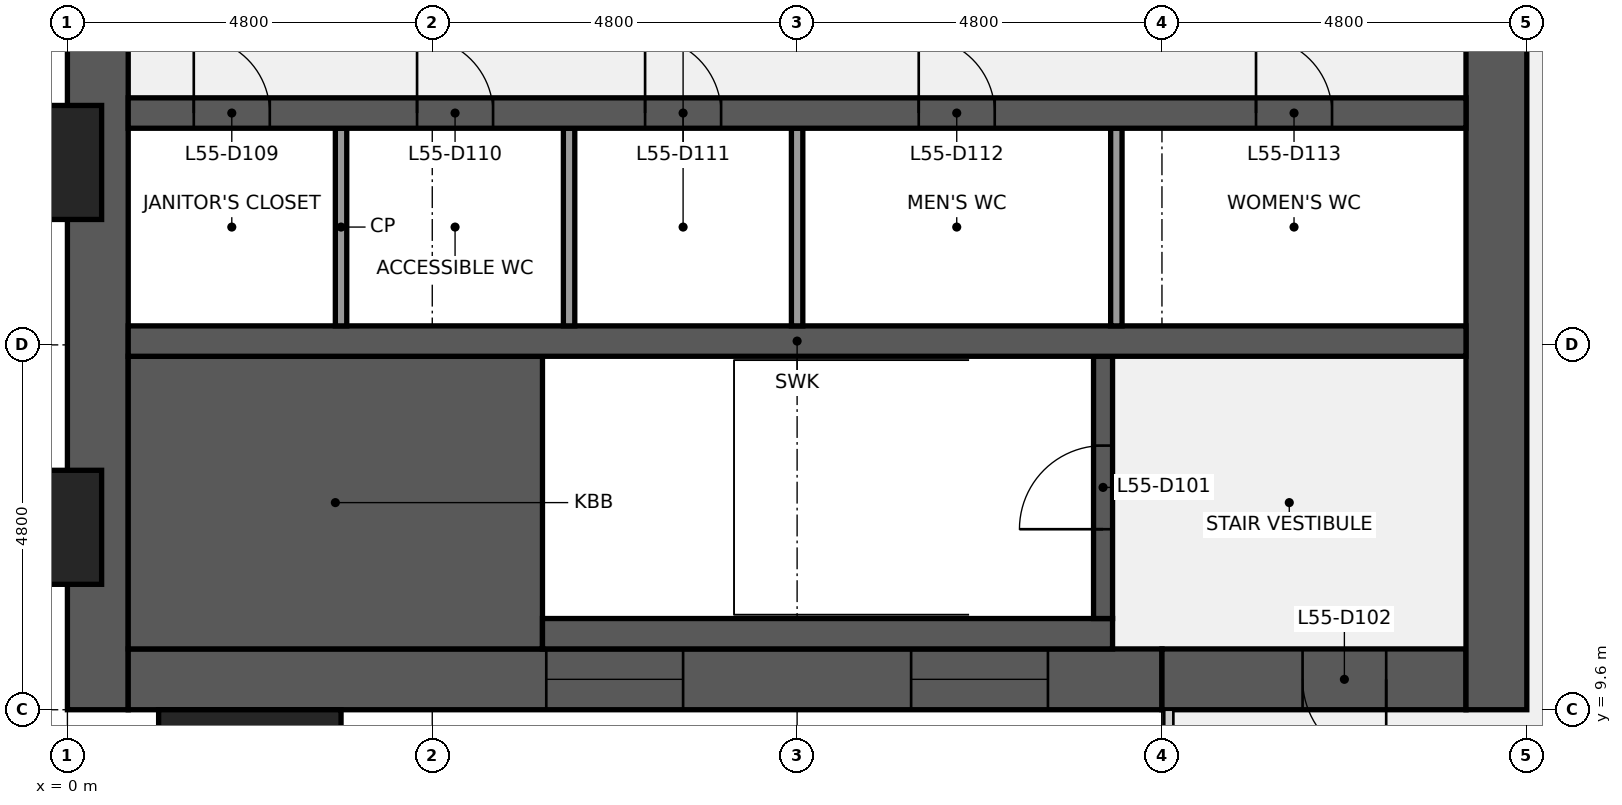
"""IFC4 building model, lengths in metres.
Left out: names, types, materials, properties, quantities, classifications, styles, units other than length and angle.
Written with IfcOpenShell. Run it as: python <this file> out.ifc"""

import sys

from ifc_helpers import new_model, si_unit, direction, frame, frame_2d, origin, origin_2d, place, context, subcontext, project, spatial, rectangle, extrude, element, fill, save


model = new_model("IFC4")
c1 = context("Model", 3, precision=1e-05, world=origin(), true_north=direction((0.0, 1.0)))
c2 = subcontext(c1, "Body", "Model", "MODEL_VIEW")
j1 = project(units=[si_unit("LENGTHUNIT", "METRE"), si_unit("PLANEANGLEUNIT", "RADIAN")], contexts=[c1])
p1 = place(None, origin())
s1 = spatial("IfcSite", under=j1, at=p1, CompositionType="ELEMENT")
p2 = place(p1, origin())
s2 = spatial("IfcBuilding", under=s1, at=p2, CompositionType="ELEMENT")
p3 = place(p2, frame((0.0, 0.0, 249.2)))
s3 = spatial("IfcBuildingStorey", under=s2, at=p3, CompositionType="ELEMENT", Elevation=249.2)
p4 = place(p3, frame((0.4, 9.6, 0.0), z_axis=(0.0, 0.0, 1.0), x_axis=(0.0, 1.0, 0.0)))
e1 = element("IfcWall", 1, at=p4, inside=s3, PredefinedType="SHEAR", context=c2, shape_type="SweptSolid", body=[
    extrude(rectangle(XDim=28.8, YDim=0.8, at=frame_2d((14.4, 0.0))), origin(), (0.0, 0.0, 1.0), 3.84),
])
p5 = place(p4, frame((8.85, 0.0, 0.9)))
e2 = element("IfcOpeningElement", 2, at=p5, cuts=e1, PredefinedType="OPENING", context=c2, shape_type="SweptSolid", body=[
    extrude(rectangle(XDim=1.5, YDim=1.5, at=frame_2d((0.75, 0.75))), frame((0.0, 0.41, 0.0), z_axis=(0.0, -1.0, 0.0), x_axis=(1.0, 0.0, 0.0)), (0.0, 0.0, 1.0), 0.82),
])
p6 = place(p4, frame((18.45, 0.0, 0.9)))
e3 = element("IfcOpeningElement", 3, at=p6, cuts=e1, PredefinedType="OPENING", context=c2, shape_type="SweptSolid", body=[
    extrude(rectangle(XDim=1.5, YDim=1.5, at=frame_2d((0.75, 0.75))), frame((0.0, 0.41, 0.0), z_axis=(0.0, -1.0, 0.0), x_axis=(1.0, 0.0, 0.0)), (0.0, 0.0, 1.0), 0.82),
])
p7 = place(p3, frame((14.4, 10.0, 0.0), z_axis=(0.0, 0.0, 1.0), x_axis=(-1.0, 0.0, 0.0)))
e4 = element("IfcWall", 4, at=p7, inside=s3, PredefinedType="SHEAR", context=c2, shape_type="SweptSolid", body=[
    extrude(rectangle(XDim=13.6, YDim=0.8, at=frame_2d((6.8, 0.0))), origin(), (0.0, 0.0, 1.0), 3.84),
])
p8 = place(p7, frame((6.3, 0.0, 0.9)))
e5 = element("IfcOpeningElement", 5, at=p8, cuts=e4, PredefinedType="OPENING", context=c2, shape_type="SweptSolid", body=[
    extrude(rectangle(XDim=1.8, YDim=1.5, at=frame_2d((0.9, 0.75))), frame((0.0, 0.41, 0.0), z_axis=(0.0, -1.0, 0.0), x_axis=(1.0, 0.0, 0.0)), (0.0, 0.0, 1.0), 0.82),
])
p9 = place(p7, frame((1.5, 0.0, 0.9)))
e6 = element("IfcOpeningElement", 6, at=p9, cuts=e4, PredefinedType="OPENING", context=c2, shape_type="SweptSolid", body=[
    extrude(rectangle(XDim=1.8, YDim=1.5, at=frame_2d((0.9, 0.75))), frame((0.0, 0.41, 0.0), z_axis=(0.0, -1.0, 0.0), x_axis=(1.0, 0.0, 0.0)), (0.0, 0.0, 1.0), 0.82),
])
p10 = place(p3, frame((18.4, 10.0, 0.0), z_axis=(0.0, 0.0, 1.0), x_axis=(-1.0, 0.0, 0.0)))
e7 = element("IfcWall", 7, at=p10, inside=s3, PredefinedType="SHEAR", context=c2, shape_type="SweptSolid", body=[
    extrude(rectangle(XDim=4.0, YDim=0.8, at=frame_2d((2.0, 0.0))), origin(), (0.0, 0.0, 1.0), 3.84),
])
p11 = place(p10, frame((1.05, 0.0, 0.0)))
e8 = element("IfcOpeningElement", 8, at=p11, cuts=e7, PredefinedType="OPENING", context=c2, shape_type="SweptSolid", body=[
    extrude(rectangle(XDim=1.1, YDim=2.1, at=frame_2d((0.55, 1.05))), frame((0.0, 0.41, 0.0), z_axis=(0.0, -1.0, 0.0), x_axis=(1.0, 0.0, 0.0)), (0.0, 0.0, 1.0), 0.82),
])
p12 = place(p3, frame((18.8, 38.4, 0.0), z_axis=(0.0, 0.0, 1.0), x_axis=(0.0, -1.0, 0.0)))
e9 = element("IfcWall", 9, at=p12, inside=s3, PredefinedType="SHEAR", context=c2, shape_type="SweptSolid", body=[
    extrude(rectangle(XDim=28.8, YDim=0.8, at=frame_2d((14.4, 0.0))), origin(), (0.0, 0.0, 1.0), 3.84),
])
p13 = place(p12, frame((18.3, 0.0, 0.0)))
e10 = element("IfcOpeningElement", 10, at=p13, cuts=e9, PredefinedType="OPENING", context=c2, shape_type="SweptSolid", body=[
    extrude(rectangle(XDim=1.8, YDim=2.1, at=frame_2d((0.9, 1.05))), frame((0.0, 0.41, 0.0), z_axis=(0.0, -1.0, 0.0), x_axis=(1.0, 0.0, 0.0)), (0.0, 0.0, 1.0), 0.82),
])
p14 = place(p12, frame((8.7, 0.0, 0.0)))
e11 = element("IfcOpeningElement", 11, at=p14, cuts=e9, PredefinedType="OPENING", context=c2, shape_type="SweptSolid", body=[
    extrude(rectangle(XDim=1.8, YDim=2.1, at=frame_2d((0.9, 1.05))), frame((0.0, 0.41, 0.0), z_axis=(0.0, -1.0, 0.0), x_axis=(1.0, 0.0, 0.0)), (0.0, 0.0, 1.0), 0.82),
])
p15 = place(p3, frame((0.8, 12.325, 0.0), z_axis=(0.0, 0.0, 1.0), x_axis=(1.0, 0.0, 0.0)))
e12 = element("IfcWall", 12, at=p15, inside=s3, PredefinedType="SHEAR", context=c2, shape_type="SweptSolid", body=[
    extrude(rectangle(XDim=5.45, YDim=3.85, at=frame_2d((2.725, 0.0))), origin(), (0.0, 0.0, 1.0), 3.84),
])
p16 = place(p3, frame((6.25, 10.6, 0.0), z_axis=(0.0, 0.0, 1.0), x_axis=(1.0, 0.0, 0.0)))
e13 = element("IfcWall", 13, at=p16, inside=s3, PredefinedType="SHEAR", context=c2, shape_type="SweptSolid", body=[
    extrude(rectangle(XDim=7.5, YDim=0.4, at=frame_2d((3.75, 0.0))), origin(), (0.0, 0.0, 1.0), 3.84),
])
p17 = place(p3, frame((13.625, 10.8, 0.0), z_axis=(0.0, 0.0, 1.0), x_axis=(0.0, 1.0, 0.0)))
e14 = element("IfcWall", 14, at=p17, inside=s3, PredefinedType="SHEAR", context=c2, shape_type="SweptSolid", body=[
    extrude(rectangle(XDim=3.45, YDim=0.25, at=frame_2d((1.725, 0.0))), origin(), (0.0, 0.0, 1.0), 3.84),
])
p18 = place(p17, frame((1.175, 0.0, 0.0)))
e15 = element("IfcOpeningElement", 15, at=p18, cuts=e14, PredefinedType="OPENING", context=c2, shape_type="SweptSolid", body=[
    extrude(rectangle(XDim=1.1, YDim=2.1, at=frame_2d((0.55, 1.05))), frame((0.0, 0.135, 0.0), z_axis=(0.0, -1.0, 0.0), x_axis=(1.0, 0.0, 0.0)), (0.0, 0.0, 1.0), 0.27),
])
p19 = place(p3, frame((0.8, 14.45, 0.0), z_axis=(0.0, 0.0, 1.0), x_axis=(1.0, 0.0, 0.0)))
e16 = element("IfcWall", 16, at=p19, inside=s3, PredefinedType="SHEAR", context=c2, shape_type="SweptSolid", body=[
    extrude(rectangle(XDim=17.6, YDim=0.4, at=frame_2d((8.8, 0.0))), origin(), (0.0, 0.0, 1.0), 3.84),
])
for number, where, z_axis, x_axis in (
    (17, (3.6, 14.65, 0.0), (0.0, 0.0, 1.0), (0.0, 1.0, 0.0)),
    (18, (6.6, 14.65, 0.0), (0.0, 0.0, 1.0), (0.0, 1.0, 0.0)),
    (19, (9.6, 14.65, 0.0), (0.0, 0.0, 1.0), (0.0, 1.0, 0.0)),
    (20, (13.8, 14.65, 0.0), (0.0, 0.0, 1.0), (0.0, 1.0, 0.0)),
):
    element("IfcWall", number, at=place(p3, frame(where, z_axis=z_axis, x_axis=x_axis)), inside=s3, PredefinedType="PARTITIONING", context=c2, shape_type="SweptSolid", body=[
        extrude(rectangle(XDim=2.6, YDim=0.15, at=frame_2d((1.3, 0.0))), origin(), (0.0, 0.0, 1.0), 3.84),
    ])
p20 = place(p3, frame((0.8, 17.45, 0.0), z_axis=(0.0, 0.0, 1.0), x_axis=(1.0, 0.0, 0.0)))
e21 = element("IfcWall", 21, at=p20, inside=s3, PredefinedType="SHEAR", context=c2, shape_type="SweptSolid", body=[
    extrude(rectangle(XDim=17.6, YDim=0.4, at=frame_2d((8.8, 0.0))), origin(), (0.0, 0.0, 1.0), 3.84),
])
p21 = place(p20, frame((0.863, 0.0, 0.0)))
e22 = element("IfcOpeningElement", 22, at=p21, cuts=e21, PredefinedType="OPENING", context=c2, shape_type="SweptSolid", body=[
    extrude(rectangle(XDim=1.0, YDim=2.1, at=frame_2d((0.5, 1.05))), frame((0.0, 0.21, 0.0), z_axis=(0.0, -1.0, 0.0), x_axis=(1.0, 0.0, 0.0)), (0.0, 0.0, 1.0), 0.42),
])
p22 = place(p20, frame((3.8, 0.0, 0.0)))
e23 = element("IfcOpeningElement", 23, at=p22, cuts=e21, PredefinedType="OPENING", context=c2, shape_type="SweptSolid", body=[
    extrude(rectangle(XDim=1.0, YDim=2.1, at=frame_2d((0.5, 1.05))), frame((0.0, 0.21, 0.0), z_axis=(0.0, -1.0, 0.0), x_axis=(1.0, 0.0, 0.0)), (0.0, 0.0, 1.0), 0.42),
])
p23 = place(p20, frame((6.8, 0.0, 0.0)))
e24 = element("IfcOpeningElement", 24, at=p23, cuts=e21, PredefinedType="OPENING", context=c2, shape_type="SweptSolid", body=[
    extrude(rectangle(XDim=1.0, YDim=2.1, at=frame_2d((0.5, 1.05))), frame((0.0, 0.21, 0.0), z_axis=(0.0, -1.0, 0.0), x_axis=(1.0, 0.0, 0.0)), (0.0, 0.0, 1.0), 0.42),
])
p24 = place(p20, frame((10.4, 0.0, 0.0)))
e25 = element("IfcOpeningElement", 25, at=p24, cuts=e21, PredefinedType="OPENING", context=c2, shape_type="SweptSolid", body=[
    extrude(rectangle(XDim=1.0, YDim=2.1, at=frame_2d((0.5, 1.05))), frame((0.0, 0.21, 0.0), z_axis=(0.0, -1.0, 0.0), x_axis=(1.0, 0.0, 0.0)), (0.0, 0.0, 1.0), 0.42),
])
p25 = place(p20, frame((14.837, 0.0, 0.0)))
e26 = element("IfcOpeningElement", 26, at=p25, cuts=e21, PredefinedType="OPENING", context=c2, shape_type="SweptSolid", body=[
    extrude(rectangle(XDim=1.0, YDim=2.1, at=frame_2d((0.5, 1.05))), frame((0.0, 0.21, 0.0), z_axis=(0.0, -1.0, 0.0), x_axis=(1.0, 0.0, 0.0)), (0.0, 0.0, 1.0), 0.42),
])
for number, where, z_axis, x_axis in (
    (27, (-0.75, 12.0, 0.0), (0.0, 0.0, 1.0), (0.0, 1.0, 0.0)),
    (28, (-0.75, 16.8, 0.0), (0.0, 0.0, 1.0), (0.0, 1.0, 0.0)),
    (29, (2.4, 8.85, 0.0), (0.0, 0.0, 1.0), (1.0, 0.0, 0.0)),
):
    element("IfcColumn", number, at=place(p3, frame(where, z_axis=z_axis, x_axis=x_axis)), inside=s3, PredefinedType="PILASTER", context=c2, shape_type="SweptSolid", body=[
        extrude(rectangle(XDim=2.4, YDim=1.5, at=origin_2d()), origin(), (0.0, 0.0, 1.0), 4.0),
    ])
p26 = place(p18, origin())
e30 = element("IfcDoor", 30, at=p26, inside=s3, OperationType="SINGLE_SWING_LEFT", PredefinedType="DOOR", context=c2, shape_type="SweptSolid", body=[
    extrude(rectangle(XDim=1.1, YDim=2.1, at=frame_2d((0.55, 1.05))), frame((0.0, 0.025, 0.0), z_axis=(0.0, -1.0, 0.0), x_axis=(1.0, 0.0, 0.0)), (0.0, 0.0, 1.0), 0.05),
])
fill(e15, e30)
p27 = place(p11, origin())
e31 = element("IfcDoor", 31, at=p27, inside=s3, OperationType="SINGLE_SWING_LEFT", PredefinedType="DOOR", context=c2, shape_type="SweptSolid", body=[
    extrude(rectangle(XDim=1.1, YDim=2.1, at=frame_2d((0.55, 1.05))), frame((0.0, 0.025, 0.0), z_axis=(0.0, -1.0, 0.0), x_axis=(1.0, 0.0, 0.0)), (0.0, 0.0, 1.0), 0.05),
])
fill(e8, e31)
p28 = place(p21, origin())
e32 = element("IfcDoor", 32, at=p28, inside=s3, OperationType="SINGLE_SWING_LEFT", PredefinedType="DOOR", context=c2, shape_type="SweptSolid", body=[
    extrude(rectangle(XDim=1.0, YDim=2.1, at=frame_2d((0.5, 1.05))), frame((0.0, 0.025, 0.0), z_axis=(0.0, -1.0, 0.0), x_axis=(1.0, 0.0, 0.0)), (0.0, 0.0, 1.0), 0.05),
])
fill(e22, e32)
p29 = place(p22, origin())
e33 = element("IfcDoor", 33, at=p29, inside=s3, OperationType="SINGLE_SWING_LEFT", PredefinedType="DOOR", context=c2, shape_type="SweptSolid", body=[
    extrude(rectangle(XDim=1.0, YDim=2.1, at=frame_2d((0.5, 1.05))), frame((0.0, 0.025, 0.0), z_axis=(0.0, -1.0, 0.0), x_axis=(1.0, 0.0, 0.0)), (0.0, 0.0, 1.0), 0.05),
])
fill(e23, e33)
p30 = place(p23, origin())
e34 = element("IfcDoor", 34, at=p30, inside=s3, OperationType="SINGLE_SWING_LEFT", PredefinedType="DOOR", context=c2, shape_type="SweptSolid", body=[
    extrude(rectangle(XDim=1.0, YDim=2.1, at=frame_2d((0.5, 1.05))), frame((0.0, 0.025, 0.0), z_axis=(0.0, -1.0, 0.0), x_axis=(1.0, 0.0, 0.0)), (0.0, 0.0, 1.0), 0.05),
])
fill(e24, e34)
p31 = place(p24, origin())
e35 = element("IfcDoor", 35, at=p31, inside=s3, OperationType="SINGLE_SWING_LEFT", PredefinedType="DOOR", context=c2, shape_type="SweptSolid", body=[
    extrude(rectangle(XDim=1.0, YDim=2.1, at=frame_2d((0.5, 1.05))), frame((0.0, 0.025, 0.0), z_axis=(0.0, -1.0, 0.0), x_axis=(1.0, 0.0, 0.0)), (0.0, 0.0, 1.0), 0.05),
])
fill(e25, e35)
p32 = place(p25, origin())
e36 = element("IfcDoor", 36, at=p32, inside=s3, OperationType="SINGLE_SWING_LEFT", PredefinedType="DOOR", context=c2, shape_type="SweptSolid", body=[
    extrude(rectangle(XDim=1.0, YDim=2.1, at=frame_2d((0.5, 1.05))), frame((0.0, 0.025, 0.0), z_axis=(0.0, -1.0, 0.0), x_axis=(1.0, 0.0, 0.0)), (0.0, 0.0, 1.0), 0.05),
])
fill(e26, e36)
p33 = place(p8, origin())
e37 = element("IfcWindow", 37, at=p33, inside=s3, PartitioningType="SINGLE_PANEL", PredefinedType="WINDOW", context=c2, shape_type="SweptSolid", body=[
    extrude(rectangle(XDim=1.8, YDim=1.5, at=frame_2d((0.9, 0.75))), frame((0.0, 0.03, 0.0), z_axis=(0.0, -1.0, 0.0), x_axis=(1.0, 0.0, 0.0)), (0.0, 0.0, 1.0), 0.06),
])
fill(e5, e37)
p34 = place(p9, origin())
e38 = element("IfcWindow", 38, at=p34, inside=s3, PartitioningType="SINGLE_PANEL", PredefinedType="WINDOW", context=c2, shape_type="SweptSolid", body=[
    extrude(rectangle(XDim=1.8, YDim=1.5, at=frame_2d((0.9, 0.75))), frame((0.0, 0.03, 0.0), z_axis=(0.0, -1.0, 0.0), x_axis=(1.0, 0.0, 0.0)), (0.0, 0.0, 1.0), 0.06),
])
fill(e6, e38)
save(model, sys.argv[1])
